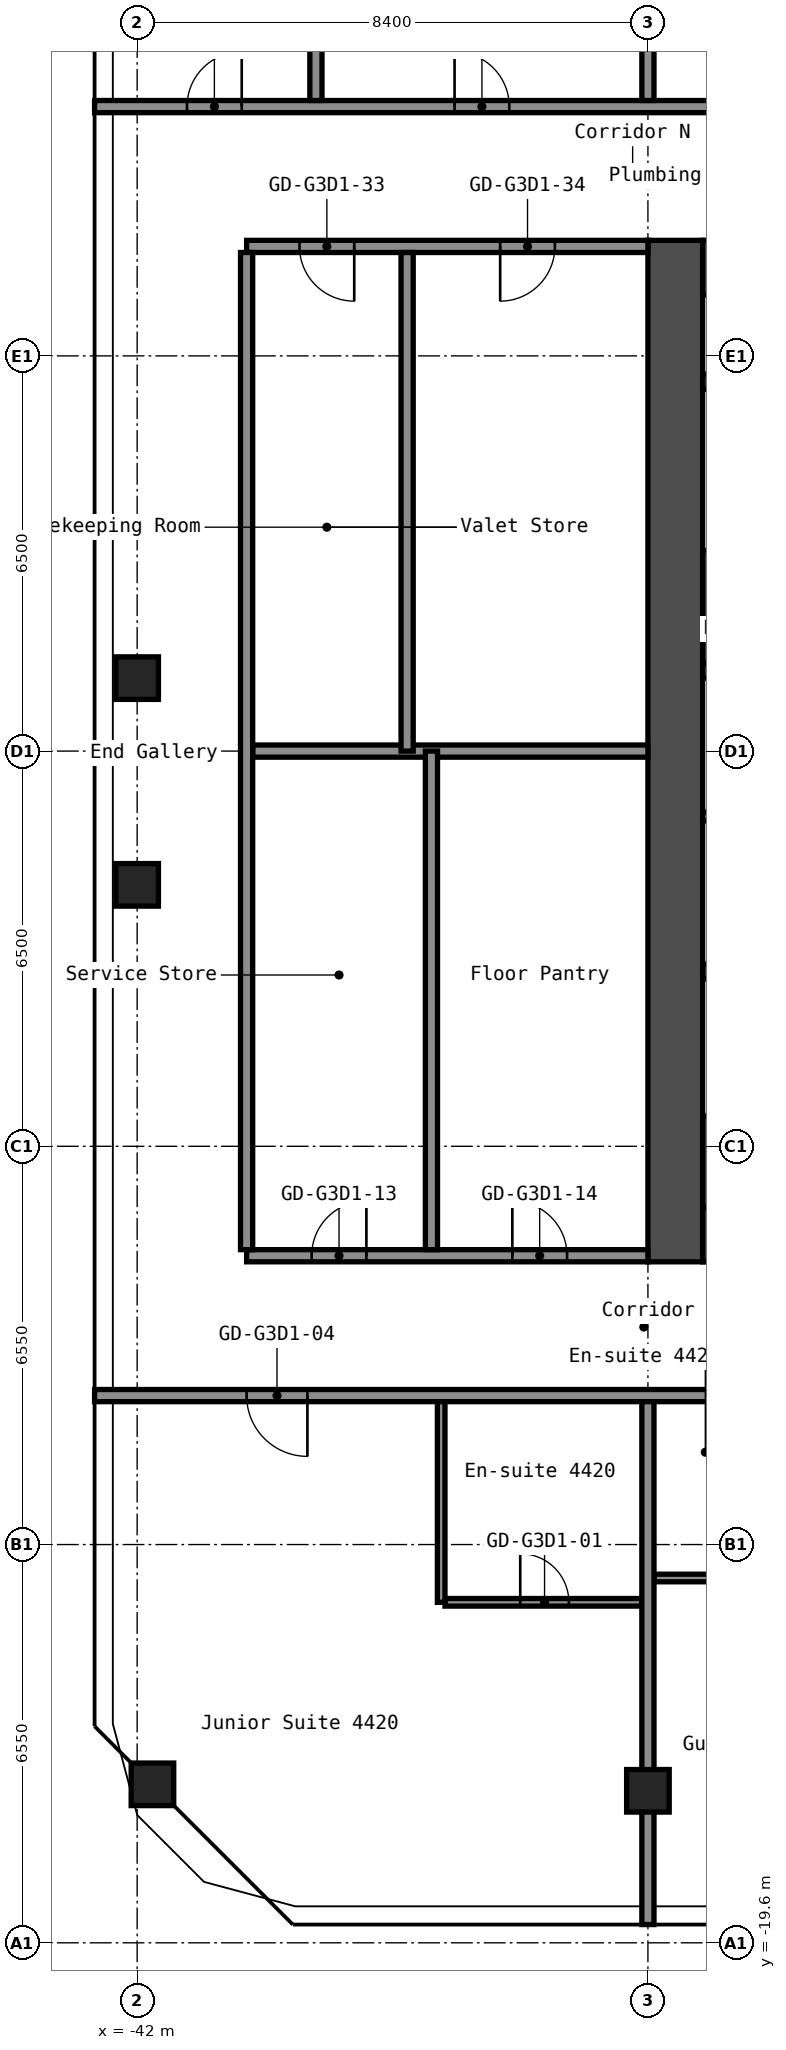
"""IFC4 building model, lengths in metres.
Left out: names, types, materials, properties, quantities, classifications, styles, units other than length and angle.
Written with IfcOpenShell. Run it as: python <this file> out.ifc"""

import sys

from ifc_helpers import new_model, si_unit, direction, frame, frame_2d, origin, origin_2d, place, context, subcontext, project, spatial, rectangle, hollow_rectangle, extrude, element, fill, save


model = new_model("IFC4")
c1 = context("Model", 3, precision=1e-05, world=origin(), true_north=direction((0.0, 1.0)))
c2 = subcontext(c1, "Body", "Model", "MODEL_VIEW")
j1 = project(units=[si_unit("LENGTHUNIT", "METRE"), si_unit("PLANEANGLEUNIT", "RADIAN")], contexts=[c1])
p1 = place(None, origin())
s1 = spatial("IfcSite", under=j1, at=p1, CompositionType="ELEMENT")
p2 = place(p1, origin())
s2 = spatial("IfcBuilding", under=s1, at=p2, CompositionType="ELEMENT")
p3 = place(p2, frame((0.0, 0.0, 156.6)))
s3 = spatial("IfcBuildingStorey", under=s2, at=p3, CompositionType="ELEMENT", Elevation=156.6)
for number, where, z_axis, x_axis in (
    (1, (-41.749, -16.994, 0.0), (0.0, 0.0, 1.0), (1.0, 0.0, 0.0)),
    (2, (-42.0, -2.2, 0.0), (0.0, 0.0, 1.0), (1.0, 0.0, 0.0)),
    (3, (-42.0, 1.2, 0.0), (0.0, 0.0, 1.0), (1.0, 0.0, 0.0)),
    (4, (-33.6, -17.1, 0.0), (0.0, 0.0, 1.0), (1.0, 0.0, 0.0)),
):
    element("IfcColumn", number, at=place(p3, frame(where, z_axis=z_axis, x_axis=x_axis)), inside=s3, PredefinedType="COLUMN", context=c2, shape_type="SweptSolid", body=[
        extrude(hollow_rectangle(XDim=0.7, YDim=0.7, WallThickness=0.028, at=origin_2d()), origin(), (0.0, 0.0, 1.0), 2.75),
    ])
p4 = place(p3, frame((-33.15, -8.4, 0.0), z_axis=(0.0, 0.0, 1.0), x_axis=(0.0, 1.0, 0.0)))
e5 = element("IfcWall", 5, at=p4, inside=s3, PredefinedType="SHEAR", context=c2, shape_type="SweptSolid", body=[
    extrude(rectangle(XDim=16.8, YDim=0.9, at=frame_2d((8.4, 0.0))), origin(), (0.0, 0.0, 1.0), 2.75),
])
p5 = place(p3, frame((-32.7, 7.95, 0.0), z_axis=(0.0, 0.0, 1.0), x_axis=(1.0, 0.0, 0.0)))
e6 = element("IfcWall", 6, at=p5, inside=s3, PredefinedType="SHEAR", context=c2, shape_type="SweptSolid", body=[
    extrude(rectangle(XDim=15.0, YDim=0.9, at=frame_2d((7.5, 0.0))), origin(), (0.0, 0.0, 1.0), 2.75),
])
p6 = place(p5, frame((3.4, 0.0, 0.0)))
e7 = element("IfcOpeningElement", 7, at=p6, cuts=e6, PredefinedType="OPENING", context=c2, shape_type="SweptSolid", body=[
    extrude(rectangle(XDim=1.2, YDim=2.1, at=frame_2d((0.6, 1.05))), frame((0.0, 0.46, 0.0), z_axis=(0.0, -1.0, 0.0), x_axis=(1.0, 0.0, 0.0)), (0.0, 0.0, 1.0), 0.92),
])
p7 = place(p5, frame((0.75, 0.0, 0.0)))
e8 = element("IfcOpeningElement", 8, at=p7, cuts=e6, PredefinedType="OPENING", context=c2, shape_type="SweptSolid", body=[
    extrude(rectangle(XDim=0.9, YDim=2.1, at=frame_2d((0.45, 1.05))), frame((0.0, 0.46, 0.0), z_axis=(0.0, -1.0, 0.0), x_axis=(1.0, 0.0, 0.0)), (0.0, 0.0, 1.0), 0.92),
])
p8 = place(p3, frame((-32.7, -7.95, 0.0), z_axis=(0.0, 0.0, 1.0), x_axis=(1.0, 0.0, 0.0)))
e9 = element("IfcWall", 9, at=p8, inside=s3, PredefinedType="SHEAR", context=c2, shape_type="SweptSolid", body=[
    extrude(rectangle(XDim=15.0, YDim=0.9, at=frame_2d((7.5, 0.0))), origin(), (0.0, 0.0, 1.0), 2.75),
])
p9 = place(p8, frame((11.45, 0.0, 0.0)))
e10 = element("IfcOpeningElement", 10, at=p9, cuts=e9, PredefinedType="OPENING", context=c2, shape_type="SweptSolid", body=[
    extrude(rectangle(XDim=1.0, YDim=2.1, at=frame_2d((0.5, 1.05))), frame((0.0, 0.46, 0.0), z_axis=(0.0, -1.0, 0.0), x_axis=(1.0, 0.0, 0.0)), (0.0, 0.0, 1.0), 0.92),
])
p10 = place(p3, frame((-32.7, 1.325, 0.0), z_axis=(0.0, 0.0, 1.0), x_axis=(1.0, 0.0, 0.0)))
e11 = element("IfcWall", 11, at=p10, inside=s3, PredefinedType="SHEAR", context=c2, shape_type="SweptSolid", body=[
    extrude(rectangle(XDim=5.05, YDim=0.25, at=frame_2d((2.525, 0.0))), origin(), (0.0, 0.0, 1.0), 2.75),
])
p11 = place(p10, frame((3.3, 0.0, 0.0)))
e12 = element("IfcOpeningElement", 12, at=p11, cuts=e11, PredefinedType="OPENING", context=c2, shape_type="SweptSolid", body=[
    extrude(rectangle(XDim=1.2, YDim=2.1, at=frame_2d((0.6, 1.05))), frame((0.0, 0.135, 0.0), z_axis=(0.0, -1.0, 0.0), x_axis=(1.0, 0.0, 0.0)), (0.0, 0.0, 1.0), 0.27),
])
p12 = place(p3, frame((-32.7, 2.375, 0.0), z_axis=(0.0, 0.0, 1.0), x_axis=(1.0, 0.0, 0.0)))
e13 = element("IfcWall", 13, at=p12, inside=s3, PredefinedType="SHEAR", context=c2, shape_type="SweptSolid", body=[
    extrude(rectangle(XDim=2.4, YDim=1.85, at=frame_2d((1.2, 0.0))), origin(), (0.0, 0.0, 1.0), 2.75),
])
p13 = place(p3, frame((-32.7, 6.075, 0.0), z_axis=(0.0, 0.0, 1.0), x_axis=(1.0, 0.0, 0.0)))
e14 = element("IfcWall", 14, at=p13, inside=s3, PredefinedType="SHEAR", context=c2, shape_type="SweptSolid", body=[
    extrude(rectangle(XDim=2.4, YDim=0.25, at=frame_2d((1.2, 0.0))), origin(), (0.0, 0.0, 1.0), 2.75),
])
p14 = place(p3, frame((-32.7, -3.625, 0.0), z_axis=(0.0, 0.0, 1.0), x_axis=(1.0, 0.0, 0.0)))
e15 = element("IfcWall", 15, at=p14, inside=s3, PredefinedType="SHEAR", context=c2, shape_type="SweptSolid", body=[
    extrude(rectangle(XDim=4.55, YDim=0.25, at=frame_2d((2.275, 0.0))), origin(), (0.0, 0.0, 1.0), 2.75),
])
p15 = place(p14, frame((2.85, 0.0, 0.0)))
e16 = element("IfcOpeningElement", 16, at=p15, cuts=e15, PredefinedType="OPENING", context=c2, shape_type="SweptSolid", body=[
    extrude(rectangle(XDim=1.1, YDim=2.1, at=frame_2d((0.55, 1.05))), frame((0.0, 0.135, 0.0), z_axis=(0.0, -1.0, 0.0), x_axis=(1.0, 0.0, 0.0)), (0.0, 0.0, 1.0), 0.27),
])
p16 = place(p14, frame((0.6, 0.0, 0.0)))
e17 = element("IfcOpeningElement", 17, at=p16, cuts=e15, PredefinedType="OPENING", context=c2, shape_type="SweptSolid", body=[
    extrude(rectangle(XDim=1.1, YDim=2.1, at=frame_2d((0.55, 1.05))), frame((0.0, 0.135, 0.0), z_axis=(0.0, -1.0, 0.0), x_axis=(1.0, 0.0, 0.0)), (0.0, 0.0, 1.0), 0.27),
])
p17 = place(p3, frame((-32.7, -6.75, 0.0), z_axis=(0.0, 0.0, 1.0), x_axis=(1.0, 0.0, 0.0)))
e18 = element("IfcWall", 18, at=p17, inside=s3, PredefinedType="SHEAR", context=c2, shape_type="SweptSolid", body=[
    extrude(rectangle(XDim=4.55, YDim=1.5, at=frame_2d((2.275, 0.0))), origin(), (0.0, 0.0, 1.0), 2.75),
])
p18 = place(p3, frame((-32.7, -1.075, 0.0), z_axis=(0.0, 0.0, 1.0), x_axis=(1.0, 0.0, 0.0)))
e19 = element("IfcWall", 19, at=p18, inside=s3, PredefinedType="PARTITIONING", context=c2, shape_type="SweptSolid", body=[
    extrude(rectangle(XDim=3.0, YDim=0.15, at=frame_2d((1.5, 0.0))), origin(), (0.0, 0.0, 1.0), 2.75),
])
p19 = place(p3, frame((-36.938, -14.0, 0.0), z_axis=(0.0, 0.0, 1.0), x_axis=(1.0, 0.0, 0.0)))
e20 = element("IfcWall", 20, at=p19, inside=s3, PredefinedType="PARTITIONING", context=c2, shape_type="SweptSolid", body=[
    extrude(rectangle(XDim=3.238, YDim=0.125, at=frame_2d((1.619, 0.0))), origin(), (0.0, 0.0, 1.0), 2.75),
])
p20 = place(p19, frame((1.238, 0.0, 0.0)))
e21 = element("IfcOpeningElement", 21, at=p20, cuts=e20, PredefinedType="OPENING", context=c2, shape_type="SweptSolid", body=[
    extrude(rectangle(XDim=0.8, YDim=2.1, at=frame_2d((0.4, 1.05))), frame((0.0, 0.073, 0.0), z_axis=(0.0, -1.0, 0.0), x_axis=(1.0, 0.0, 0.0)), (0.0, 0.0, 1.0), 0.145),
])
p21 = place(p3, frame((-33.5, -13.6, 0.0), z_axis=(0.0, 0.0, 1.0), x_axis=(1.0, 0.0, 0.0)))
e22 = element("IfcWall", 22, at=p21, inside=s3, PredefinedType="PARTITIONING", context=c2, shape_type="SweptSolid", body=[
    extrude(rectangle(XDim=2.337, YDim=0.125, at=frame_2d((1.169, 0.0))), origin(), (0.0, 0.0, 1.0), 2.75),
])
p22 = place(p3, frame((-42.7, -10.6, 0.0), z_axis=(0.0, 0.0, 1.0), x_axis=(1.0, 0.0, 0.0)))
e23 = element("IfcWall", 23, at=p22, inside=s3, PredefinedType="PARTITIONING", context=c2, shape_type="SweptSolid", body=[
    extrude(rectangle(XDim=25.9, YDim=0.2, at=frame_2d((12.95, 0.0))), origin(), (0.0, 0.0, 1.0), 2.75),
])
p23 = place(p22, frame((2.5, 0.0, 0.0)))
e24 = element("IfcOpeningElement", 24, at=p23, cuts=e23, PredefinedType="OPENING", context=c2, shape_type="SweptSolid", body=[
    extrude(rectangle(XDim=1.0, YDim=2.1, at=frame_2d((0.5, 1.05))), frame((0.0, 0.11, 0.0), z_axis=(0.0, -1.0, 0.0), x_axis=(1.0, 0.0, 0.0)), (0.0, 0.0, 1.0), 0.22),
])
p24 = place(p22, frame((11.95, 0.0, 0.0)))
e25 = element("IfcOpeningElement", 25, at=p24, cuts=e23, PredefinedType="OPENING", context=c2, shape_type="SweptSolid", body=[
    extrude(rectangle(XDim=1.0, YDim=2.1, at=frame_2d((0.5, 1.05))), frame((0.0, 0.11, 0.0), z_axis=(0.0, -1.0, 0.0), x_axis=(1.0, 0.0, 0.0)), (0.0, 0.0, 1.0), 0.22),
])
p25 = place(p22, frame((13.65, 0.0, 0.0)))
e26 = element("IfcOpeningElement", 26, at=p25, cuts=e23, PredefinedType="OPENING", context=c2, shape_type="SweptSolid", body=[
    extrude(rectangle(XDim=1.0, YDim=2.1, at=frame_2d((0.5, 1.05))), frame((0.0, 0.11, 0.0), z_axis=(0.0, -1.0, 0.0), x_axis=(1.0, 0.0, 0.0)), (0.0, 0.0, 1.0), 0.22),
])
p26 = place(p22, frame((22.9, 0.0, 0.0)))
e27 = element("IfcOpeningElement", 27, at=p26, cuts=e23, PredefinedType="OPENING", context=c2, shape_type="SweptSolid", body=[
    extrude(rectangle(XDim=1.0, YDim=2.1, at=frame_2d((0.5, 1.05))), frame((0.0, 0.11, 0.0), z_axis=(0.0, -1.0, 0.0), x_axis=(1.0, 0.0, 0.0)), (0.0, 0.0, 1.0), 0.22),
])
p27 = place(p3, frame((-40.2, -8.3, 0.0), z_axis=(0.0, 0.0, 1.0), x_axis=(1.0, 0.0, 0.0)))
e28 = element("IfcWall", 28, at=p27, inside=s3, PredefinedType="PARTITIONING", context=c2, shape_type="SweptSolid", body=[
    extrude(rectangle(XDim=6.6, YDim=0.2, at=frame_2d((3.3, 0.0))), origin(), (0.0, 0.0, 1.0), 2.75),
])
p28 = place(p27, frame((1.07, 0.0, 0.0)))
e29 = element("IfcOpeningElement", 29, at=p28, cuts=e28, PredefinedType="OPENING", context=c2, shape_type="SweptSolid", body=[
    extrude(rectangle(XDim=0.9, YDim=2.1, at=frame_2d((0.45, 1.05))), frame((0.0, 0.11, 0.0), z_axis=(0.0, -1.0, 0.0), x_axis=(1.0, 0.0, 0.0)), (0.0, 0.0, 1.0), 0.22),
])
p29 = place(p27, frame((4.37, 0.0, 0.0)))
e30 = element("IfcOpeningElement", 30, at=p29, cuts=e28, PredefinedType="OPENING", context=c2, shape_type="SweptSolid", body=[
    extrude(rectangle(XDim=0.9, YDim=2.1, at=frame_2d((0.45, 1.05))), frame((0.0, 0.11, 0.0), z_axis=(0.0, -1.0, 0.0), x_axis=(1.0, 0.0, 0.0)), (0.0, 0.0, 1.0), 0.22),
])
p30 = place(p3, frame((-40.1, 0.0, 0.0), z_axis=(0.0, 0.0, 1.0), x_axis=(1.0, 0.0, 0.0)))
e31 = element("IfcWall", 31, at=p30, inside=s3, PredefinedType="PARTITIONING", context=c2, shape_type="SweptSolid", body=[
    extrude(rectangle(XDim=6.5, YDim=0.2, at=frame_2d((3.25, 0.0))), origin(), (0.0, 0.0, 1.0), 2.75),
])
p31 = place(p3, frame((-40.2, 8.3, 0.0), z_axis=(0.0, 0.0, 1.0), x_axis=(1.0, 0.0, 0.0)))
e32 = element("IfcWall", 32, at=p31, inside=s3, PredefinedType="PARTITIONING", context=c2, shape_type="SweptSolid", body=[
    extrude(rectangle(XDim=6.6, YDim=0.2, at=frame_2d((3.3, 0.0))), origin(), (0.0, 0.0, 1.0), 2.75),
])
p32 = place(p31, frame((0.87, 0.0, 0.0)))
e33 = element("IfcOpeningElement", 33, at=p32, cuts=e32, PredefinedType="OPENING", context=c2, shape_type="SweptSolid", body=[
    extrude(rectangle(XDim=0.9, YDim=2.1, at=frame_2d((0.45, 1.05))), frame((0.0, 0.11, 0.0), z_axis=(0.0, -1.0, 0.0), x_axis=(1.0, 0.0, 0.0)), (0.0, 0.0, 1.0), 0.22),
])
p33 = place(p31, frame((4.17, 0.0, 0.0)))
e34 = element("IfcOpeningElement", 34, at=p33, cuts=e32, PredefinedType="OPENING", context=c2, shape_type="SweptSolid", body=[
    extrude(rectangle(XDim=0.9, YDim=2.1, at=frame_2d((0.45, 1.05))), frame((0.0, 0.11, 0.0), z_axis=(0.0, -1.0, 0.0), x_axis=(1.0, 0.0, 0.0)), (0.0, 0.0, 1.0), 0.22),
])
p34 = place(p3, frame((-42.7, 10.6, 0.0), z_axis=(0.0, 0.0, 1.0), x_axis=(1.0, 0.0, 0.0)))
e35 = element("IfcWall", 35, at=p34, inside=s3, PredefinedType="PARTITIONING", context=c2, shape_type="SweptSolid", body=[
    extrude(rectangle(XDim=25.9, YDim=0.2, at=frame_2d((12.95, 0.0))), origin(), (0.0, 0.0, 1.0), 2.75),
])
p35 = place(p34, frame((1.52, 0.0, 0.0)))
e36 = element("IfcOpeningElement", 36, at=p35, cuts=e35, PredefinedType="OPENING", context=c2, shape_type="SweptSolid", body=[
    extrude(rectangle(XDim=0.9, YDim=2.1, at=frame_2d((0.45, 1.05))), frame((0.0, 0.11, 0.0), z_axis=(0.0, -1.0, 0.0), x_axis=(1.0, 0.0, 0.0)), (0.0, 0.0, 1.0), 0.22),
])
p36 = place(p34, frame((5.92, 0.0, 0.0)))
e37 = element("IfcOpeningElement", 37, at=p36, cuts=e35, PredefinedType="OPENING", context=c2, shape_type="SweptSolid", body=[
    extrude(rectangle(XDim=0.9, YDim=2.1, at=frame_2d((0.45, 1.05))), frame((0.0, 0.11, 0.0), z_axis=(0.0, -1.0, 0.0), x_axis=(1.0, 0.0, 0.0)), (0.0, 0.0, 1.0), 0.22),
])
p37 = place(p34, frame((10.415, 0.0, 0.0)))
e38 = element("IfcOpeningElement", 38, at=p37, cuts=e35, PredefinedType="OPENING", context=c2, shape_type="SweptSolid", body=[
    extrude(rectangle(XDim=0.9, YDim=2.1, at=frame_2d((0.45, 1.05))), frame((0.0, 0.11, 0.0), z_axis=(0.0, -1.0, 0.0), x_axis=(1.0, 0.0, 0.0)), (0.0, 0.0, 1.0), 0.22),
])
p38 = place(p34, frame((14.615, 0.0, 0.0)))
e39 = element("IfcOpeningElement", 39, at=p38, cuts=e35, PredefinedType="OPENING", context=c2, shape_type="SweptSolid", body=[
    extrude(rectangle(XDim=0.9, YDim=2.1, at=frame_2d((0.45, 1.05))), frame((0.0, 0.11, 0.0), z_axis=(0.0, -1.0, 0.0), x_axis=(1.0, 0.0, 0.0)), (0.0, 0.0, 1.0), 0.22),
])
p39 = place(p34, frame((19.655, 0.0, 0.0)))
e40 = element("IfcOpeningElement", 40, at=p39, cuts=e35, PredefinedType="OPENING", context=c2, shape_type="SweptSolid", body=[
    extrude(rectangle(XDim=0.9, YDim=2.1, at=frame_2d((0.45, 1.05))), frame((0.0, 0.11, 0.0), z_axis=(0.0, -1.0, 0.0), x_axis=(1.0, 0.0, 0.0)), (0.0, 0.0, 1.0), 0.22),
])
p40 = place(p34, frame((23.855, 0.0, 0.0)))
e41 = element("IfcOpeningElement", 41, at=p40, cuts=e35, PredefinedType="OPENING", context=c2, shape_type="SweptSolid", body=[
    extrude(rectangle(XDim=0.9, YDim=2.1, at=frame_2d((0.45, 1.05))), frame((0.0, 0.11, 0.0), z_axis=(0.0, -1.0, 0.0), x_axis=(1.0, 0.0, 0.0)), (0.0, 0.0, 1.0), 0.22),
])
p41 = place(p3, frame((-40.2, -8.2, 0.0), z_axis=(0.0, 0.0, 1.0), x_axis=(0.0, 1.0, 0.0)))
e42 = element("IfcWall", 42, at=p41, inside=s3, PredefinedType="PARTITIONING", context=c2, shape_type="SweptSolid", body=[
    extrude(rectangle(XDim=16.4, YDim=0.2, at=frame_2d((8.2, 0.0))), origin(), (0.0, 0.0, 1.0), 2.75),
])
p42 = place(p3, frame((-39.06, 10.7, 0.0), z_axis=(0.0, 0.0, 1.0), x_axis=(0.0, 1.0, 0.0)))
e43 = element("IfcWall", 43, at=p42, inside=s3, PredefinedType="PARTITIONING", context=c2, shape_type="SweptSolid", body=[
    extrude(rectangle(XDim=7.6, YDim=0.2, at=frame_2d((3.8, 0.0))), origin(), (0.0, 0.0, 1.0), 2.75),
])
for number, where, z_axis, x_axis in (
    (44, (-37.56, 0.0, 0.0), (0.0, 0.0, 1.0), (0.0, 1.0, 0.0)),
    (45, (-37.16, -8.2, 0.0), (0.0, 0.0, 1.0), (0.0, 1.0, 0.0)),
):
    element("IfcWall", number, at=place(p3, frame(where, z_axis=z_axis, x_axis=x_axis)), inside=s3, PredefinedType="PARTITIONING", context=c2, shape_type="SweptSolid", body=[
        extrude(rectangle(XDim=8.2, YDim=0.2, at=frame_2d((4.1, 0.0))), origin(), (0.0, 0.0, 1.0), 2.75),
    ])
p43 = place(p3, frame((-37.0, -14.0, 0.0), z_axis=(0.0, 0.0, 1.0), x_axis=(0.0, 1.0, 0.0)))
e46 = element("IfcWall", 46, at=p43, inside=s3, PredefinedType="PARTITIONING", context=c2, shape_type="SweptSolid", body=[
    extrude(rectangle(XDim=3.3, YDim=0.125, at=frame_2d((1.65, 0.0))), origin(), (0.0, 0.0, 1.0), 2.75),
])
p44 = place(p3, frame((-33.6, -19.3, 0.0), z_axis=(0.0, 0.0, 1.0), x_axis=(0.0, 1.0, 0.0)))
e47 = element("IfcWall", 47, at=p44, inside=s3, PredefinedType="PARTITIONING", context=c2, shape_type="SweptSolid", body=[
    extrude(rectangle(XDim=8.6, YDim=0.2, at=frame_2d((4.3, 0.0))), origin(), (0.0, 0.0, 1.0), 2.75),
])
p45 = place(p3, frame((-33.6, 10.7, 0.0), z_axis=(0.0, 0.0, 1.0), x_axis=(0.0, 1.0, 0.0)))
e48 = element("IfcWall", 48, at=p45, inside=s3, PredefinedType="PARTITIONING", context=c2, shape_type="SweptSolid", body=[
    extrude(rectangle(XDim=7.6, YDim=0.2, at=frame_2d((3.8, 0.0))), origin(), (0.0, 0.0, 1.0), 2.75),
])
p46 = place(p20, origin())
e49 = element("IfcDoor", 49, at=p46, inside=s3, OperationType="SINGLE_SWING_RIGHT", PredefinedType="DOOR", context=c2, shape_type="SweptSolid", body=[
    extrude(rectangle(XDim=0.8, YDim=2.1, at=frame_2d((0.4, 1.05))), frame((0.0, 0.025, 0.0), z_axis=(0.0, -1.0, 0.0), x_axis=(1.0, 0.0, 0.0)), (0.0, 0.0, 1.0), 0.05),
])
fill(e21, e49)
p47 = place(p23, origin())
e50 = element("IfcDoor", 50, at=p47, inside=s3, OperationType="SINGLE_SWING_RIGHT", PredefinedType="DOOR", context=c2, shape_type="SweptSolid", body=[
    extrude(rectangle(XDim=1.0, YDim=2.1, at=frame_2d((0.5, 1.05))), frame((0.0, 0.025, 0.0), z_axis=(0.0, -1.0, 0.0), x_axis=(1.0, 0.0, 0.0)), (0.0, 0.0, 1.0), 0.05),
])
fill(e24, e50)
p48 = place(p28, origin())
e51 = element("IfcDoor", 51, at=p48, inside=s3, OperationType="SINGLE_SWING_LEFT", PredefinedType="DOOR", context=c2, shape_type="SweptSolid", body=[
    extrude(rectangle(XDim=0.9, YDim=2.1, at=frame_2d((0.45, 1.05))), frame((0.0, 0.025, 0.0), z_axis=(0.0, -1.0, 0.0), x_axis=(1.0, 0.0, 0.0)), (0.0, 0.0, 1.0), 0.05),
])
fill(e29, e51)
p49 = place(p29, origin())
e52 = element("IfcDoor", 52, at=p49, inside=s3, OperationType="SINGLE_SWING_RIGHT", PredefinedType="DOOR", context=c2, shape_type="SweptSolid", body=[
    extrude(rectangle(XDim=0.9, YDim=2.1, at=frame_2d((0.45, 1.05))), frame((0.0, 0.025, 0.0), z_axis=(0.0, -1.0, 0.0), x_axis=(1.0, 0.0, 0.0)), (0.0, 0.0, 1.0), 0.05),
])
fill(e30, e52)
p50 = place(p32, origin())
e53 = element("IfcDoor", 53, at=p50, inside=s3, OperationType="SINGLE_SWING_RIGHT", PredefinedType="DOOR", context=c2, shape_type="SweptSolid", body=[
    extrude(rectangle(XDim=0.9, YDim=2.1, at=frame_2d((0.45, 1.05))), frame((0.0, 0.025, 0.0), z_axis=(0.0, -1.0, 0.0), x_axis=(1.0, 0.0, 0.0)), (0.0, 0.0, 1.0), 0.05),
])
fill(e33, e53)
p51 = place(p33, origin())
e54 = element("IfcDoor", 54, at=p51, inside=s3, OperationType="SINGLE_SWING_LEFT", PredefinedType="DOOR", context=c2, shape_type="SweptSolid", body=[
    extrude(rectangle(XDim=0.9, YDim=2.1, at=frame_2d((0.45, 1.05))), frame((0.0, 0.025, 0.0), z_axis=(0.0, -1.0, 0.0), x_axis=(1.0, 0.0, 0.0)), (0.0, 0.0, 1.0), 0.05),
])
fill(e34, e54)
p52 = place(p35, origin())
e55 = element("IfcDoor", 55, at=p52, inside=s3, OperationType="SINGLE_SWING_LEFT", PredefinedType="DOOR", context=c2, shape_type="SweptSolid", body=[
    extrude(rectangle(XDim=0.9, YDim=2.1, at=frame_2d((0.45, 1.05))), frame((0.0, 0.025, 0.0), z_axis=(0.0, -1.0, 0.0), x_axis=(1.0, 0.0, 0.0)), (0.0, 0.0, 1.0), 0.05),
])
fill(e36, e55)
p53 = place(p36, origin())
e56 = element("IfcDoor", 56, at=p53, inside=s3, OperationType="SINGLE_SWING_RIGHT", PredefinedType="DOOR", context=c2, shape_type="SweptSolid", body=[
    extrude(rectangle(XDim=0.9, YDim=2.1, at=frame_2d((0.45, 1.05))), frame((0.0, 0.025, 0.0), z_axis=(0.0, -1.0, 0.0), x_axis=(1.0, 0.0, 0.0)), (0.0, 0.0, 1.0), 0.05),
])
fill(e37, e56)
save(model, sys.argv[1])
